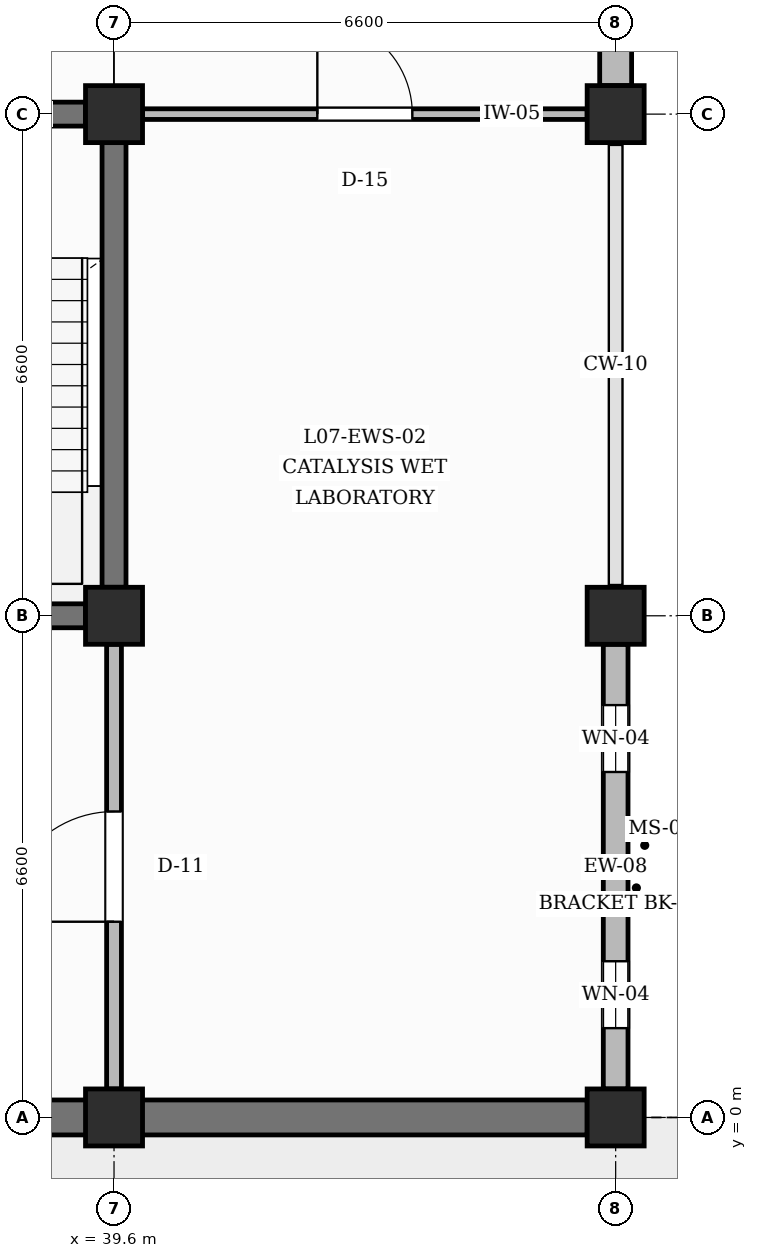
"""IFC4 building model, lengths in metres.
Left out: names, types, materials, properties, quantities, classifications, styles, units other than length and angle.
Written with IfcOpenShell. Run it as: python <this file> out.ifc"""

import sys

from ifc_helpers import new_model, si_unit, direction, frame, frame_2d, origin, origin_2d, place, context, subcontext, project, spatial, rectangle, extrude, element, fill, save


model = new_model("IFC4")
c1 = context("Model", 3, precision=1e-05, world=origin(), true_north=direction((0.0, 1.0)))
c2 = subcontext(c1, "Body", "Model", "MODEL_VIEW")
j1 = project(units=[si_unit("LENGTHUNIT", "METRE"), si_unit("PLANEANGLEUNIT", "RADIAN")], contexts=[c1])
p1 = place(None, origin())
s1 = spatial("IfcSite", under=j1, at=p1, CompositionType="ELEMENT")
p2 = place(p1, origin())
s2 = spatial("IfcBuilding", under=s1, at=p2, CompositionType="ELEMENT")
p3 = place(p2, frame((0.0, 0.0, 31.2)))
s3 = spatial("IfcBuildingStorey", under=s2, at=p3, CompositionType="ELEMENT", Elevation=31.2)
for number, where, z_axis, x_axis in (
    (1, (39.6, 0.0, 0.0), (0.0, 0.0, 1.0), (1.0, 0.0, 0.0)),
    (2, (39.6, 6.6, 0.0), (0.0, 0.0, 1.0), (1.0, 0.0, 0.0)),
    (3, (39.6, 13.2, 0.0), (0.0, 0.0, 1.0), (1.0, 0.0, 0.0)),
    (4, (46.2, 0.0, 0.0), (0.0, 0.0, 1.0), (1.0, 0.0, 0.0)),
    (5, (46.2, 6.6, 0.0), (0.0, 0.0, 1.0), (1.0, 0.0, 0.0)),
    (6, (46.2, 13.2, 0.0), (0.0, 0.0, 1.0), (1.0, 0.0, 0.0)),
):
    element("IfcColumn", number, at=place(p3, frame(where, z_axis=z_axis, x_axis=x_axis)), inside=s3, PredefinedType="COLUMN", context=c2, shape_type="SweptSolid", body=[
        extrude(rectangle(XDim=0.75, YDim=0.75, at=origin_2d()), origin(), (0.0, 0.0, 1.0), 4.2),
    ])
p4 = place(p3, frame((33.4, 0.0, 0.0), z_axis=(0.0, 0.0, 1.0), x_axis=(1.0, 0.0, 0.0)))
e7 = element("IfcWall", 7, at=p4, inside=s3, PredefinedType="SOLIDWALL", context=c2, shape_type="SweptSolid", body=[
    extrude(rectangle(XDim=5.825, YDim=0.46, at=frame_2d((2.913, 0.0))), origin(), (0.0, 0.0, 1.0), 3.28),
])
p5 = place(p3, frame((39.975, 0.0, 0.0), z_axis=(0.0, 0.0, 1.0), x_axis=(1.0, 0.0, 0.0)))
e8 = element("IfcWall", 8, at=p5, inside=s3, PredefinedType="SOLIDWALL", context=c2, shape_type="SweptSolid", body=[
    extrude(rectangle(XDim=5.85, YDim=0.46, at=frame_2d((2.925, 0.0))), origin(), (0.0, 0.0, 1.0), 3.28),
])
p6 = place(p3, frame((46.2, 0.375, 0.0), z_axis=(0.0, 0.0, 1.0), x_axis=(0.0, 1.0, 0.0)))
e9 = element("IfcWall", 9, at=p6, inside=s3, PredefinedType="SOLIDWALL", context=c2, shape_type="SweptSolid", body=[
    extrude(rectangle(XDim=5.85, YDim=0.325, at=frame_2d((2.925, 0.0))), origin(), (0.0, 0.0, 1.0), 3.28),
])
p7 = place(p6, frame((0.8, 0.0, 0.95)))
e10 = element("IfcOpeningElement", 10, at=p7, cuts=e9, PredefinedType="OPENING", context=c2, shape_type="SweptSolid", body=[
    extrude(rectangle(XDim=0.88, YDim=1.96, at=frame_2d((0.44, 0.98))), frame((0.0, 0.172, 0.0), z_axis=(0.0, -1.0, 0.0), x_axis=(1.0, 0.0, 0.0)), (0.0, 0.0, 1.0), 0.345),
])
p8 = place(p6, frame((4.17, 0.0, 0.95)))
e11 = element("IfcOpeningElement", 11, at=p8, cuts=e9, PredefinedType="OPENING", context=c2, shape_type="SweptSolid", body=[
    extrude(rectangle(XDim=0.88, YDim=1.96, at=frame_2d((0.44, 0.98))), frame((0.0, 0.172, 0.0), z_axis=(0.0, -1.0, 0.0), x_axis=(1.0, 0.0, 0.0)), (0.0, 0.0, 1.0), 0.345),
])
p9 = place(p3, frame((46.2, 13.575, 0.0), z_axis=(0.0, 0.0, 1.0), x_axis=(0.0, 1.0, 0.0)))
e12 = element("IfcWall", 12, at=p9, inside=s3, PredefinedType="SOLIDWALL", context=c2, shape_type="SweptSolid", body=[
    extrude(rectangle(XDim=5.85, YDim=0.42, at=frame_2d((2.925, 0.0))), origin(), (0.0, 0.0, 1.0), 3.28),
])
p10 = place(p9, frame((0.8, 0.0, 0.95)))
e13 = element("IfcOpeningElement", 13, at=p10, cuts=e12, PredefinedType="OPENING", context=c2, shape_type="SweptSolid", body=[
    extrude(rectangle(XDim=1.02, YDim=1.3, at=frame_2d((0.51, 0.65))), frame((0.0, 0.22, 0.0), z_axis=(0.0, -1.0, 0.0), x_axis=(1.0, 0.0, 0.0)), (0.0, 0.0, 1.0), 0.44),
])
p11 = place(p9, frame((4.03, 0.0, 0.95)))
e14 = element("IfcOpeningElement", 14, at=p11, cuts=e12, PredefinedType="OPENING", context=c2, shape_type="SweptSolid", body=[
    extrude(rectangle(XDim=1.02, YDim=1.3, at=frame_2d((0.51, 0.65))), frame((0.0, 0.22, 0.0), z_axis=(0.0, -1.0, 0.0), x_axis=(1.0, 0.0, 0.0)), (0.0, 0.0, 1.0), 0.44),
])
p12 = place(p3, frame((33.4, 6.6, 0.0), z_axis=(0.0, 0.0, 1.0), x_axis=(1.0, 0.0, 0.0)))
e15 = element("IfcWall", 15, at=p12, inside=s3, PredefinedType="SHEAR", context=c2, shape_type="SweptSolid", body=[
    extrude(rectangle(XDim=5.825, YDim=0.315, at=frame_2d((2.913, 0.0))), origin(), (0.0, 0.0, 1.0), 3.18),
])
p13 = place(p3, frame((33.4, 13.2, 0.0), z_axis=(0.0, 0.0, 1.0), x_axis=(1.0, 0.0, 0.0)))
e16 = element("IfcWall", 16, at=p13, inside=s3, PredefinedType="SHEAR", context=c2, shape_type="SweptSolid", body=[
    extrude(rectangle(XDim=5.825, YDim=0.315, at=frame_2d((2.913, 0.0))), origin(), (0.0, 0.0, 1.0), 3.18),
])
p14 = place(p13, frame((2.363, 0.0, 0.0)))
e17 = element("IfcOpeningElement", 17, at=p14, cuts=e16, PredefinedType="OPENING", context=c2, shape_type="SweptSolid", body=[
    extrude(rectangle(XDim=1.1, YDim=2.15, at=frame_2d((0.55, 1.075))), frame((0.0, 0.167, 0.0), z_axis=(0.0, -1.0, 0.0), x_axis=(1.0, 0.0, 0.0)), (0.0, 0.0, 1.0), 0.335),
])
p15 = place(p3, frame((39.6, 6.975, 0.0), z_axis=(0.0, 0.0, 1.0), x_axis=(0.0, 1.0, 0.0)))
e18 = element("IfcWall", 18, at=p15, inside=s3, PredefinedType="SHEAR", context=c2, shape_type="SweptSolid", body=[
    extrude(rectangle(XDim=5.85, YDim=0.315, at=frame_2d((2.925, 0.0))), origin(), (0.0, 0.0, 1.0), 3.18),
])
p16 = place(p3, frame((39.6, 0.375, 0.0), z_axis=(0.0, 0.0, 1.0), x_axis=(0.0, 1.0, 0.0)))
e19 = element("IfcWall", 19, at=p16, inside=s3, PredefinedType="PARTITIONING", context=c2, shape_type="SweptSolid", body=[
    extrude(rectangle(XDim=5.85, YDim=0.195, at=frame_2d((2.925, 0.0))), origin(), (0.0, 0.0, 1.0), 3.18),
])
p17 = place(p16, frame((2.2, 0.0, 0.0)))
e20 = element("IfcOpeningElement", 20, at=p17, cuts=e19, PredefinedType="OPENING", context=c2, shape_type="SweptSolid", body=[
    extrude(rectangle(XDim=1.45, YDim=2.25, at=frame_2d((0.725, 1.125))), frame((0.0, 0.107, 0.0), z_axis=(0.0, -1.0, 0.0), x_axis=(1.0, 0.0, 0.0)), (0.0, 0.0, 1.0), 0.215),
])
p18 = place(p3, frame((39.975, 13.2, 0.0), z_axis=(0.0, 0.0, 1.0), x_axis=(1.0, 0.0, 0.0)))
e21 = element("IfcWall", 21, at=p18, inside=s3, PredefinedType="PARTITIONING", context=c2, shape_type="SweptSolid", body=[
    extrude(rectangle(XDim=5.85, YDim=0.14, at=frame_2d((2.925, 0.0))), origin(), (0.0, 0.0, 1.0), 3.18),
])
p19 = place(p18, frame((2.3, 0.0, 0.0)))
e22 = element("IfcOpeningElement", 22, at=p19, cuts=e21, PredefinedType="OPENING", context=c2, shape_type="SweptSolid", body=[
    extrude(rectangle(XDim=1.25, YDim=2.25, at=frame_2d((0.625, 1.125))), frame((0.0, 0.08, 0.0), z_axis=(0.0, -1.0, 0.0), x_axis=(1.0, 0.0, 0.0)), (0.0, 0.0, 1.0), 0.16),
])
p20 = place(p7, origin())
e23 = element("IfcWindow", 23, at=p20, inside=s3, PartitioningType="SINGLE_PANEL", PredefinedType="WINDOW", context=c2, shape_type="SweptSolid", body=[
    extrude(rectangle(XDim=0.88, YDim=1.96, at=frame_2d((0.44, 0.98))), frame((0.0, 0.03, 0.0), z_axis=(0.0, -1.0, 0.0), x_axis=(1.0, 0.0, 0.0)), (0.0, 0.0, 1.0), 0.06),
])
fill(e10, e23)
p21 = place(p8, origin())
e24 = element("IfcWindow", 24, at=p21, inside=s3, PartitioningType="SINGLE_PANEL", PredefinedType="WINDOW", context=c2, shape_type="SweptSolid", body=[
    extrude(rectangle(XDim=0.88, YDim=1.96, at=frame_2d((0.44, 0.98))), frame((0.0, 0.03, 0.0), z_axis=(0.0, -1.0, 0.0), x_axis=(1.0, 0.0, 0.0)), (0.0, 0.0, 1.0), 0.06),
])
fill(e11, e24)
p22 = place(p19, origin())
e25 = element("IfcDoor", 25, at=p22, inside=s3, OperationType="SINGLE_SWING_LEFT", PredefinedType="DOOR", context=c2, shape_type="SweptSolid", body=[
    extrude(rectangle(XDim=1.25, YDim=2.25, at=frame_2d((0.625, 1.125))), frame((0.0, 0.025, 0.0), z_axis=(0.0, -1.0, 0.0), x_axis=(1.0, 0.0, 0.0)), (0.0, 0.0, 1.0), 0.05),
])
fill(e22, e25)
p23 = place(p17, origin())
e26 = element("IfcDoor", 26, at=p23, inside=s3, OperationType="SINGLE_SWING_LEFT", PredefinedType="DOOR", context=c2, shape_type="SweptSolid", body=[
    extrude(rectangle(XDim=1.45, YDim=2.25, at=frame_2d((0.725, 1.125))), frame((0.0, 0.025, 0.0), z_axis=(0.0, -1.0, 0.0), x_axis=(1.0, 0.0, 0.0)), (0.0, 0.0, 1.0), 0.05),
])
fill(e20, e26)
save(model, sys.argv[1])
